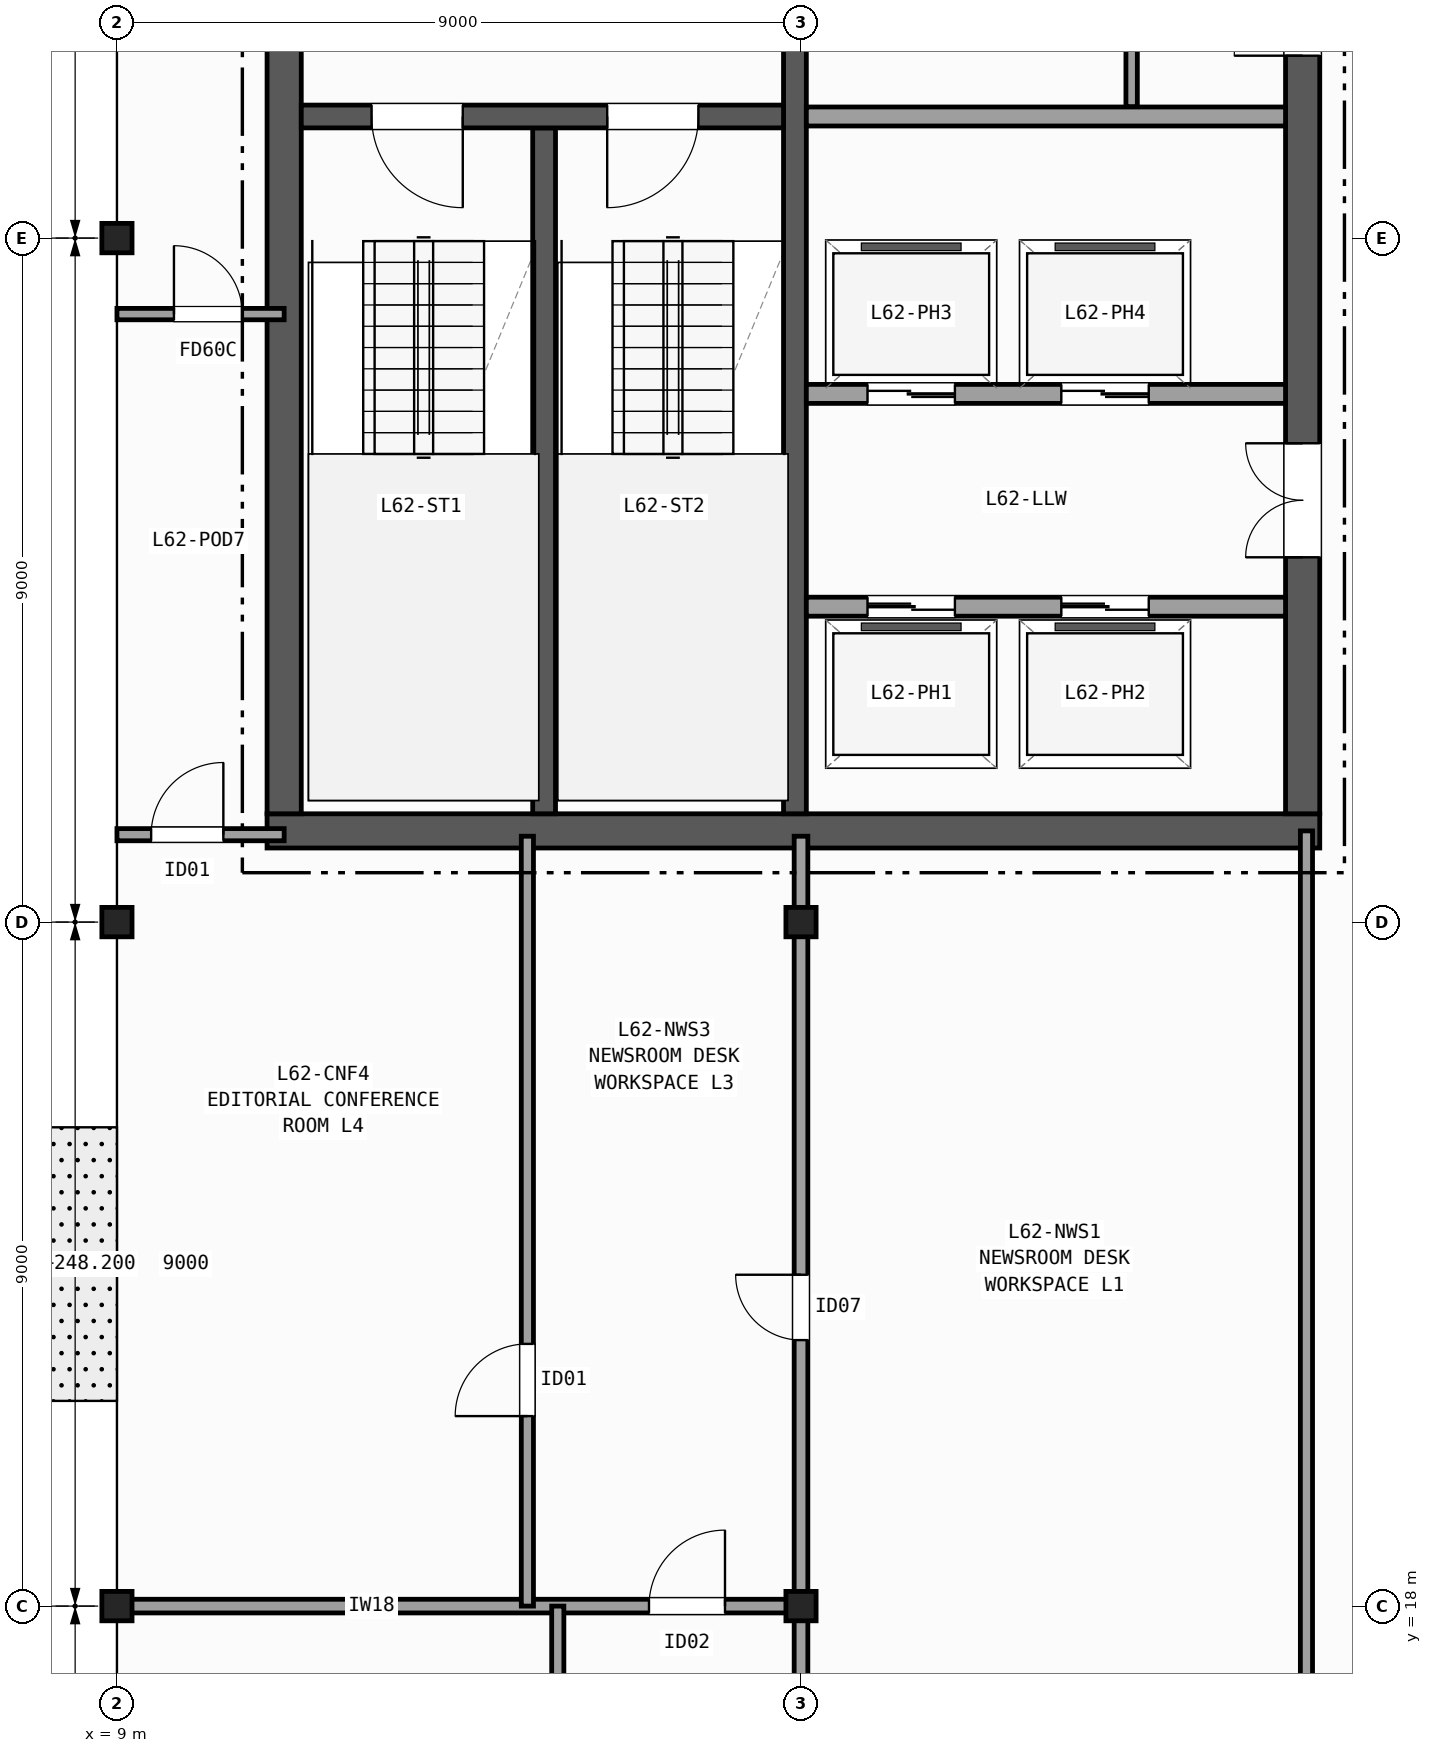
"""IFC4 building model, lengths in metres.
Left out: names, types, materials, properties, quantities, classifications, styles, units other than length and angle.
Written with IfcOpenShell. Run it as: python <this file> out.ifc"""

import sys

from ifc_helpers import new_model, si_unit, direction, frame, frame_2d, origin, origin_2d, place, context, subcontext, project, spatial, rectangle, i_section, extrude, element, fill, save


model = new_model("IFC4")
c1 = context("Model", 3, precision=1e-05, world=origin(), true_north=direction((0.0, 1.0)))
c2 = subcontext(c1, "Body", "Model", "MODEL_VIEW")
j1 = project(units=[si_unit("LENGTHUNIT", "METRE"), si_unit("PLANEANGLEUNIT", "RADIAN")], contexts=[c1])
p1 = place(None, origin())
s1 = spatial("IfcSite", under=j1, at=p1, CompositionType="ELEMENT")
p2 = place(p1, origin())
s2 = spatial("IfcBuilding", under=s1, at=p2, CompositionType="ELEMENT")
p3 = place(p2, frame((0.0, 0.0, 248.2)))
s3 = spatial("IfcBuildingStorey", under=s2, at=p3, CompositionType="ELEMENT", Elevation=248.2)
for number, where, z_axis, x_axis in (
    (1, (9.0, 18.0, 0.0), (0.0, 0.0, 1.0), (1.0, 0.0, 0.0)),
    (2, (9.0, 27.0, 0.0), (0.0, 0.0, 1.0), (1.0, 0.0, 0.0)),
    (3, (9.0, 36.0, 0.0), (0.0, 0.0, 1.0), (1.0, 0.0, 0.0)),
    (4, (18.0, 18.0, 0.0), (0.0, 0.0, 1.0), (1.0, 0.0, 0.0)),
    (5, (18.0, 27.0, 0.0), (0.0, 0.0, 1.0), (1.0, 0.0, 0.0)),
):
    element("IfcColumn", number, at=place(p3, frame(where, z_axis=z_axis, x_axis=x_axis)), inside=s3, PredefinedType="COLUMN", context=c2, shape_type="SweptSolid", body=[
        extrude(i_section(OverallWidth=0.397, OverallDepth=0.387, WebThickness=0.021, FlangeThickness=0.033, FilletRadius=0.015, at=origin_2d()), origin(), (0.0, 0.0, 1.0), 3.7),
    ])
p4 = place(p3, frame((10.975, 28.2, 0.0), z_axis=(0.0, 0.0, 1.0), x_axis=(1.0, 0.0, 0.0)))
e6 = element("IfcWall", 6, at=p4, inside=s3, PredefinedType="SHEAR", context=c2, shape_type="SweptSolid", body=[
    extrude(rectangle(XDim=13.85, YDim=0.45, at=frame_2d((6.925, 0.0))), origin(), (0.0, 0.0, 1.0), 3.42),
])
p5 = place(p3, frame((11.2, 42.175, 0.0), z_axis=(0.0, 0.0, 1.0), x_axis=(0.0, -1.0, 0.0)))
e7 = element("IfcWall", 7, at=p5, inside=s3, PredefinedType="SHEAR", context=c2, shape_type="SweptSolid", body=[
    extrude(rectangle(XDim=13.75, YDim=0.45, at=frame_2d((6.875, 0.0))), origin(), (0.0, 0.0, 1.0), 3.42),
])
p6 = place(p3, frame((24.6, 28.425, 0.0), z_axis=(0.0, 0.0, 1.0), x_axis=(0.0, 1.0, 0.0)))
e8 = element("IfcWall", 8, at=p6, inside=s3, PredefinedType="SHEAR", context=c2, shape_type="SweptSolid", body=[
    extrude(rectangle(XDim=13.75, YDim=0.45, at=frame_2d((6.875, 0.0))), origin(), (0.0, 0.0, 1.0), 3.42),
])
p7 = place(p6, frame((3.375, 0.0, 0.0)))
e9 = element("IfcOpeningElement", 9, at=p7, cuts=e8, PredefinedType="OPENING", context=c2, shape_type="SweptSolid", body=[
    extrude(rectangle(XDim=1.5, YDim=2.2, at=frame_2d((0.75, 1.1))), frame((0.0, 0.235, 0.0), z_axis=(0.0, -1.0, 0.0), x_axis=(1.0, 0.0, 0.0)), (0.0, 0.0, 1.0), 0.47),
])
p8 = place(p6, frame((9.975, 0.0, 0.0)))
e10 = element("IfcOpeningElement", 10, at=p8, cuts=e8, PredefinedType="OPENING", context=c2, shape_type="SweptSolid", body=[
    extrude(rectangle(XDim=0.9, YDim=2.1, at=frame_2d((0.45, 1.05))), frame((0.0, 0.235, 0.0), z_axis=(0.0, -1.0, 0.0), x_axis=(1.0, 0.0, 0.0)), (0.0, 0.0, 1.0), 0.47),
])
p9 = place(p6, frame((12.075, 0.0, 0.0)))
e11 = element("IfcOpeningElement", 11, at=p9, cuts=e8, PredefinedType="OPENING", context=c2, shape_type="SweptSolid", body=[
    extrude(rectangle(XDim=0.9, YDim=2.1, at=frame_2d((0.45, 1.05))), frame((0.0, 0.235, 0.0), z_axis=(0.0, -1.0, 0.0), x_axis=(1.0, 0.0, 0.0)), (0.0, 0.0, 1.0), 0.47),
])
p10 = place(p3, frame((14.62, 28.425, 0.0), z_axis=(0.0, 0.0, 1.0), x_axis=(0.0, 1.0, 0.0)))
e12 = element("IfcWall", 12, at=p10, inside=s3, PredefinedType="SHEAR", context=c2, shape_type="SweptSolid", body=[
    extrude(rectangle(XDim=9.025, YDim=0.3, at=frame_2d((4.512, 0.0))), origin(), (0.0, 0.0, 1.0), 3.42),
])
p11 = place(p3, frame((17.92, 42.175, 0.0), z_axis=(0.0, 0.0, 1.0), x_axis=(0.0, -1.0, 0.0)))
e13 = element("IfcWall", 13, at=p11, inside=s3, PredefinedType="SHEAR", context=c2, shape_type="SweptSolid", body=[
    extrude(rectangle(XDim=13.75, YDim=0.3, at=frame_2d((6.875, 0.0))), origin(), (0.0, 0.0, 1.0), 3.42),
])
p12 = place(p11, frame((2.0, 0.0, 0.0)))
e14 = element("IfcOpeningElement", 14, at=p12, cuts=e13, PredefinedType="OPENING", context=c2, shape_type="SweptSolid", body=[
    extrude(rectangle(XDim=1.15, YDim=2.15, at=frame_2d((0.575, 1.075))), frame((0.0, 0.16, 0.0), z_axis=(0.0, -1.0, 0.0), x_axis=(1.0, 0.0, 0.0)), (0.0, 0.0, 1.0), 0.32),
])
p13 = place(p3, frame((17.77, 37.6, 0.0), z_axis=(0.0, 0.0, 1.0), x_axis=(-1.0, 0.0, 0.0)))
e15 = element("IfcWall", 15, at=p13, inside=s3, PredefinedType="SHEAR", context=c2, shape_type="SweptSolid", body=[
    extrude(rectangle(XDim=6.345, YDim=0.3, at=frame_2d((3.172, 0.0))), origin(), (0.0, 0.0, 1.0), 3.42),
])
p14 = place(p13, frame((4.22, 0.0, 0.0)))
e16 = element("IfcOpeningElement", 16, at=p14, cuts=e15, PredefinedType="OPENING", context=c2, shape_type="SweptSolid", body=[
    extrude(rectangle(XDim=1.2, YDim=2.15, at=frame_2d((0.6, 1.075))), frame((0.0, 0.16, 0.0), z_axis=(0.0, -1.0, 0.0), x_axis=(1.0, 0.0, 0.0)), (0.0, 0.0, 1.0), 0.32),
])
p15 = place(p13, frame((1.12, 0.0, 0.0)))
e17 = element("IfcOpeningElement", 17, at=p15, cuts=e15, PredefinedType="OPENING", context=c2, shape_type="SweptSolid", body=[
    extrude(rectangle(XDim=1.2, YDim=2.15, at=frame_2d((0.6, 1.075))), frame((0.0, 0.16, 0.0), z_axis=(0.0, -1.0, 0.0), x_axis=(1.0, 0.0, 0.0)), (0.0, 0.0, 1.0), 0.32),
])
p16 = place(p3, frame((18.07, 37.6, 0.0), z_axis=(0.0, 0.0, 1.0), x_axis=(1.0, 0.0, 0.0)))
e18 = element("IfcWall", 18, at=p16, inside=s3, PredefinedType="PARTITIONING", context=c2, shape_type="SweptSolid", body=[
    extrude(rectangle(XDim=6.305, YDim=0.25, at=frame_2d((3.152, 0.0))), origin(), (0.0, 0.0, 1.0), 3.42),
])
p17 = place(p3, frame((18.07, 31.15, 0.0), z_axis=(0.0, 0.0, 1.0), x_axis=(1.0, 0.0, 0.0)))
e19 = element("IfcWall", 19, at=p17, inside=s3, PredefinedType="PARTITIONING", context=c2, shape_type="SweptSolid", body=[
    extrude(rectangle(XDim=6.305, YDim=0.25, at=frame_2d((3.152, 0.0))), origin(), (0.0, 0.0, 1.0), 3.42),
])
p18 = place(p17, frame((0.805, 0.0, 0.0)))
e20 = element("IfcOpeningElement", 20, at=p18, cuts=e19, PredefinedType="OPENING", context=c2, shape_type="SweptSolid", body=[
    extrude(rectangle(XDim=1.15, YDim=2.15, at=frame_2d((0.575, 1.075))), frame((0.0, 0.135, 0.0), z_axis=(0.0, -1.0, 0.0), x_axis=(1.0, 0.0, 0.0)), (0.0, 0.0, 1.0), 0.27),
])
p19 = place(p17, frame((3.355, 0.0, 0.0)))
e21 = element("IfcOpeningElement", 21, at=p19, cuts=e19, PredefinedType="OPENING", context=c2, shape_type="SweptSolid", body=[
    extrude(rectangle(XDim=1.15, YDim=2.15, at=frame_2d((0.575, 1.075))), frame((0.0, 0.135, 0.0), z_axis=(0.0, -1.0, 0.0), x_axis=(1.0, 0.0, 0.0)), (0.0, 0.0, 1.0), 0.27),
])
p20 = place(p3, frame((24.375, 33.95, 0.0), z_axis=(0.0, 0.0, 1.0), x_axis=(-1.0, 0.0, 0.0)))
e22 = element("IfcWall", 22, at=p20, inside=s3, PredefinedType="PARTITIONING", context=c2, shape_type="SweptSolid", body=[
    extrude(rectangle(XDim=6.305, YDim=0.25, at=frame_2d((3.152, 0.0))), origin(), (0.0, 0.0, 1.0), 3.42),
])
p21 = place(p20, frame((4.35, 0.0, 0.0)))
e23 = element("IfcOpeningElement", 23, at=p21, cuts=e22, PredefinedType="OPENING", context=c2, shape_type="SweptSolid", body=[
    extrude(rectangle(XDim=1.15, YDim=2.15, at=frame_2d((0.575, 1.075))), frame((0.0, 0.135, 0.0), z_axis=(0.0, -1.0, 0.0), x_axis=(1.0, 0.0, 0.0)), (0.0, 0.0, 1.0), 0.27),
])
p22 = place(p20, frame((1.8, 0.0, 0.0)))
e24 = element("IfcOpeningElement", 24, at=p22, cuts=e22, PredefinedType="OPENING", context=c2, shape_type="SweptSolid", body=[
    extrude(rectangle(XDim=1.15, YDim=2.15, at=frame_2d((0.575, 1.075))), frame((0.0, 0.135, 0.0), z_axis=(0.0, -1.0, 0.0), x_axis=(1.0, 0.0, 0.0)), (0.0, 0.0, 1.0), 0.27),
])
p23 = place(p3, frame((22.35, 37.73, 0.0), z_axis=(0.0, 0.0, 1.0), x_axis=(0.0, 1.0, 0.0)))
e25 = element("IfcWall", 25, at=p23, inside=s3, PredefinedType="PARTITIONING", context=c2, shape_type="SweptSolid", body=[
    extrude(rectangle(XDim=4.445, YDim=0.15, at=frame_2d((2.223, 0.0))), origin(), (0.0, 0.0, 1.0), 3.42),
])
p24 = place(p3, frame((9.0, 28.15, 0.0), z_axis=(0.0, 0.0, 1.0), x_axis=(1.0, 0.0, 0.0)))
e26 = element("IfcWall", 26, at=p24, inside=s3, PredefinedType="PARTITIONING", context=c2, shape_type="SweptSolid", body=[
    extrude(rectangle(XDim=2.2, YDim=0.16, at=frame_2d((1.1, 0.0))), origin(), (0.0, 0.0, 1.0), 2.707),
])
p25 = place(p24, frame((0.45, 0.0, 0.0)))
e27 = element("IfcOpeningElement", 27, at=p25, cuts=e26, PredefinedType="OPENING", context=c2, shape_type="SweptSolid", body=[
    extrude(rectangle(XDim=0.95, YDim=2.1, at=frame_2d((0.475, 1.05))), frame((0.0, 0.09, 0.0), z_axis=(0.0, -1.0, 0.0), x_axis=(1.0, 0.0, 0.0)), (0.0, 0.0, 1.0), 0.18),
])
p26 = place(p3, frame((9.0, 35.0, 0.0), z_axis=(0.0, 0.0, 1.0), x_axis=(1.0, 0.0, 0.0)))
e28 = element("IfcWall", 28, at=p26, inside=s3, PredefinedType="PARTITIONING", context=c2, shape_type="SweptSolid", body=[
    extrude(rectangle(XDim=2.2, YDim=0.15, at=frame_2d((1.1, 0.0))), origin(), (0.0, 0.0, 1.0), 2.707),
])
p27 = place(p26, frame((0.75, 0.0, 0.0)))
e29 = element("IfcOpeningElement", 29, at=p27, cuts=e28, PredefinedType="OPENING", context=c2, shape_type="SweptSolid", body=[
    extrude(rectangle(XDim=0.9, YDim=2.1, at=frame_2d((0.45, 1.05))), frame((0.0, 0.085, 0.0), z_axis=(0.0, -1.0, 0.0), x_axis=(1.0, 0.0, 0.0)), (0.0, 0.0, 1.0), 0.17),
])
p28 = place(p3, frame((24.65, 9.0, 0.0), z_axis=(0.0, 0.0, 1.0), x_axis=(0.0, 1.0, 0.0)))
e30 = element("IfcWall", 30, at=p28, inside=s3, PredefinedType="PARTITIONING", context=c2, shape_type="SweptSolid", body=[
    extrude(rectangle(XDim=19.2, YDim=0.16, at=frame_2d((9.6, 0.0))), origin(), (0.0, 0.0, 1.0), 2.707),
])
p29 = place(p28, frame((7.0, 0.0, 0.0)))
e31 = element("IfcOpeningElement", 31, at=p29, cuts=e30, PredefinedType="OPENING", context=c2, shape_type="SweptSolid", body=[
    extrude(rectangle(XDim=1.05, YDim=2.15, at=frame_2d((0.525, 1.075))), frame((0.0, 0.09, 0.0), z_axis=(0.0, -1.0, 0.0), x_axis=(1.0, 0.0, 0.0)), (0.0, 0.0, 1.0), 0.18),
])
p30 = place(p28, frame((2.55, 0.0, 0.0)))
e32 = element("IfcOpeningElement", 32, at=p30, cuts=e30, PredefinedType="OPENING", context=c2, shape_type="SweptSolid", body=[
    extrude(rectangle(XDim=1.2, YDim=2.15, at=frame_2d((0.6, 1.075))), frame((0.0, 0.09, 0.0), z_axis=(0.0, -1.0, 0.0), x_axis=(1.0, 0.0, 0.0)), (0.0, 0.0, 1.0), 0.18),
])
p31 = place(p3, frame((9.0, 18.0, 0.0), z_axis=(0.0, 0.0, 1.0), x_axis=(1.0, 0.0, 0.0)))
e33 = element("IfcWall", 33, at=p31, inside=s3, PredefinedType="PARTITIONING", context=c2, shape_type="SweptSolid", body=[
    extrude(rectangle(XDim=9.08, YDim=0.18, at=frame_2d((4.54, 0.0))), origin(), (0.0, 0.0, 1.0), 2.707),
])
p32 = place(p31, frame((7.0, 0.0, 0.0)))
e34 = element("IfcOpeningElement", 34, at=p32, cuts=e33, PredefinedType="OPENING", context=c2, shape_type="SweptSolid", body=[
    extrude(rectangle(XDim=1.0, YDim=2.1, at=frame_2d((0.5, 1.05))), frame((0.0, 0.1, 0.0), z_axis=(0.0, -1.0, 0.0), x_axis=(1.0, 0.0, 0.0)), (0.0, 0.0, 1.0), 0.2),
])
p33 = place(p3, frame((18.0, 14.2, 0.0), z_axis=(0.0, 0.0, 1.0), x_axis=(0.0, 1.0, 0.0)))
e35 = element("IfcWall", 35, at=p33, inside=s3, PredefinedType="PARTITIONING", context=c2, shape_type="SweptSolid", body=[
    extrude(rectangle(XDim=13.93, YDim=0.18, at=frame_2d((6.965, 0.0))), origin(), (0.0, 0.0, 1.0), 2.789),
])
p34 = place(p33, frame((7.3, 0.0, 0.0)))
e36 = element("IfcOpeningElement", 36, at=p34, cuts=e35, PredefinedType="OPENING", context=c2, shape_type="SweptSolid", body=[
    extrude(rectangle(XDim=0.86, YDim=2.05, at=frame_2d((0.43, 1.025))), frame((0.0, 0.1, 0.0), z_axis=(0.0, -1.0, 0.0), x_axis=(1.0, 0.0, 0.0)), (0.0, 0.0, 1.0), 0.2),
])
p35 = place(p3, frame((14.4, 18.0, 0.0), z_axis=(0.0, 0.0, 1.0), x_axis=(0.0, 1.0, 0.0)))
e37 = element("IfcWall", 37, at=p35, inside=s3, PredefinedType="PARTITIONING", context=c2, shape_type="SweptSolid", body=[
    extrude(rectangle(XDim=10.13, YDim=0.16, at=frame_2d((5.065, 0.0))), origin(), (0.0, 0.0, 1.0), 2.789),
])
p36 = place(p35, frame((2.5, 0.0, 0.0)))
e38 = element("IfcOpeningElement", 38, at=p36, cuts=e37, PredefinedType="OPENING", context=c2, shape_type="SweptSolid", body=[
    extrude(rectangle(XDim=0.95, YDim=2.1, at=frame_2d((0.475, 1.05))), frame((0.0, 0.09, 0.0), z_axis=(0.0, -1.0, 0.0), x_axis=(1.0, 0.0, 0.0)), (0.0, 0.0, 1.0), 0.18),
])
p37 = place(p3, frame((14.8, 9.0, 0.0), z_axis=(0.0, 0.0, 1.0), x_axis=(0.0, 1.0, 0.0)))
e39 = element("IfcWall", 39, at=p37, inside=s3, PredefinedType="PARTITIONING", context=c2, shape_type="SweptSolid", body=[
    extrude(rectangle(XDim=9.0, YDim=0.16, at=frame_2d((4.5, 0.0))), origin(), (0.0, 0.0, 1.0), 2.789),
])
p38 = place(p37, frame((2.5, 0.0, 0.0)))
e40 = element("IfcOpeningElement", 40, at=p38, cuts=e39, PredefinedType="OPENING", context=c2, shape_type="SweptSolid", body=[
    extrude(rectangle(XDim=1.05, YDim=2.15, at=frame_2d((0.525, 1.075))), frame((0.0, 0.09, 0.0), z_axis=(0.0, -1.0, 0.0), x_axis=(1.0, 0.0, 0.0)), (0.0, 0.0, 1.0), 0.18),
])
p39 = place(p14, origin())
e41 = element("IfcDoor", 41, at=p39, inside=s3, OperationType="SINGLE_SWING_LEFT", PredefinedType="DOOR", context=c2, shape_type="SweptSolid", body=[
    extrude(rectangle(XDim=1.2, YDim=2.15, at=frame_2d((0.6, 1.075))), frame((0.0, 0.025, 0.0), z_axis=(0.0, -1.0, 0.0), x_axis=(1.0, 0.0, 0.0)), (0.0, 0.0, 1.0), 0.05),
])
fill(e16, e41)
p40 = place(p15, origin())
e42 = element("IfcDoor", 42, at=p40, inside=s3, OperationType="SINGLE_SWING_RIGHT", PredefinedType="DOOR", context=c2, shape_type="SweptSolid", body=[
    extrude(rectangle(XDim=1.2, YDim=2.15, at=frame_2d((0.6, 1.075))), frame((0.0, 0.025, 0.0), z_axis=(0.0, -1.0, 0.0), x_axis=(1.0, 0.0, 0.0)), (0.0, 0.0, 1.0), 0.05),
])
fill(e17, e42)
p41 = place(p7, origin())
e43 = element("IfcDoor", 43, at=p41, inside=s3, OperationType="DOUBLE_DOOR_SINGLE_SWING", PredefinedType="DOOR", context=c2, shape_type="SweptSolid", body=[
    extrude(rectangle(XDim=1.5, YDim=2.2, at=frame_2d((0.75, 1.1))), frame((0.0, 0.025, 0.0), z_axis=(0.0, -1.0, 0.0), x_axis=(1.0, 0.0, 0.0)), (0.0, 0.0, 1.0), 0.05),
])
fill(e9, e43)
p42 = place(p8, origin())
e44 = element("IfcDoor", 44, at=p42, inside=s3, OperationType="SINGLE_SWING_LEFT", PredefinedType="DOOR", context=c2, shape_type="SweptSolid", body=[
    extrude(rectangle(XDim=0.9, YDim=2.1, at=frame_2d((0.45, 1.05))), frame((0.0, 0.025, 0.0), z_axis=(0.0, -1.0, 0.0), x_axis=(1.0, 0.0, 0.0)), (0.0, 0.0, 1.0), 0.05),
])
fill(e10, e44)
p43 = place(p18, origin())
e45 = element("IfcDoor", 45, at=p43, inside=s3, OperationType="DOUBLE_DOOR_SLIDING", PredefinedType="DOOR", context=c2, shape_type="SweptSolid", body=[
    extrude(rectangle(XDim=1.15, YDim=2.15, at=frame_2d((0.575, 1.075))), frame((0.0, 0.025, 0.0), z_axis=(0.0, -1.0, 0.0), x_axis=(1.0, 0.0, 0.0)), (0.0, 0.0, 1.0), 0.05),
])
fill(e20, e45)
p44 = place(p19, origin())
e46 = element("IfcDoor", 46, at=p44, inside=s3, OperationType="DOUBLE_DOOR_SLIDING", PredefinedType="DOOR", context=c2, shape_type="SweptSolid", body=[
    extrude(rectangle(XDim=1.15, YDim=2.15, at=frame_2d((0.575, 1.075))), frame((0.0, 0.025, 0.0), z_axis=(0.0, -1.0, 0.0), x_axis=(1.0, 0.0, 0.0)), (0.0, 0.0, 1.0), 0.05),
])
fill(e21, e46)
p45 = place(p21, origin())
e47 = element("IfcDoor", 47, at=p45, inside=s3, OperationType="DOUBLE_DOOR_SLIDING", PredefinedType="DOOR", context=c2, shape_type="SweptSolid", body=[
    extrude(rectangle(XDim=1.15, YDim=2.15, at=frame_2d((0.575, 1.075))), frame((0.0, 0.025, 0.0), z_axis=(0.0, -1.0, 0.0), x_axis=(1.0, 0.0, 0.0)), (0.0, 0.0, 1.0), 0.05),
])
fill(e23, e47)
p46 = place(p22, origin())
e48 = element("IfcDoor", 48, at=p46, inside=s3, OperationType="DOUBLE_DOOR_SLIDING", PredefinedType="DOOR", context=c2, shape_type="SweptSolid", body=[
    extrude(rectangle(XDim=1.15, YDim=2.15, at=frame_2d((0.575, 1.075))), frame((0.0, 0.025, 0.0), z_axis=(0.0, -1.0, 0.0), x_axis=(1.0, 0.0, 0.0)), (0.0, 0.0, 1.0), 0.05),
])
fill(e24, e48)
p47 = place(p25, origin())
e49 = element("IfcDoor", 49, at=p47, inside=s3, OperationType="SINGLE_SWING_RIGHT", PredefinedType="DOOR", context=c2, shape_type="SweptSolid", body=[
    extrude(rectangle(XDim=0.95, YDim=2.1, at=frame_2d((0.475, 1.05))), frame((0.0, 0.025, 0.0), z_axis=(0.0, -1.0, 0.0), x_axis=(1.0, 0.0, 0.0)), (0.0, 0.0, 1.0), 0.05),
])
fill(e27, e49)
p48 = place(p27, origin())
e50 = element("IfcDoor", 50, at=p48, inside=s3, OperationType="SINGLE_SWING_LEFT", PredefinedType="DOOR", context=c2, shape_type="SweptSolid", body=[
    extrude(rectangle(XDim=0.9, YDim=2.1, at=frame_2d((0.45, 1.05))), frame((0.0, 0.025, 0.0), z_axis=(0.0, -1.0, 0.0), x_axis=(1.0, 0.0, 0.0)), (0.0, 0.0, 1.0), 0.05),
])
fill(e29, e50)
p49 = place(p34, origin())
e51 = element("IfcDoor", 51, at=p49, inside=s3, OperationType="SINGLE_SWING_RIGHT", PredefinedType="DOOR", context=c2, shape_type="SweptSolid", body=[
    extrude(rectangle(XDim=0.86, YDim=2.05, at=frame_2d((0.43, 1.025))), frame((0.0, 0.025, 0.0), z_axis=(0.0, -1.0, 0.0), x_axis=(1.0, 0.0, 0.0)), (0.0, 0.0, 1.0), 0.05),
])
fill(e36, e51)
p50 = place(p36, origin())
e52 = element("IfcDoor", 52, at=p50, inside=s3, OperationType="SINGLE_SWING_LEFT", PredefinedType="DOOR", context=c2, shape_type="SweptSolid", body=[
    extrude(rectangle(XDim=0.95, YDim=2.1, at=frame_2d((0.475, 1.05))), frame((0.0, 0.025, 0.0), z_axis=(0.0, -1.0, 0.0), x_axis=(1.0, 0.0, 0.0)), (0.0, 0.0, 1.0), 0.05),
])
fill(e38, e52)
p51 = place(p32, origin())
e53 = element("IfcDoor", 53, at=p51, inside=s3, OperationType="SINGLE_SWING_RIGHT", PredefinedType="DOOR", context=c2, shape_type="SweptSolid", body=[
    extrude(rectangle(XDim=1.0, YDim=2.1, at=frame_2d((0.5, 1.05))), frame((0.0, 0.025, 0.0), z_axis=(0.0, -1.0, 0.0), x_axis=(1.0, 0.0, 0.0)), (0.0, 0.0, 1.0), 0.05),
])
fill(e34, e53)
save(model, sys.argv[1])
